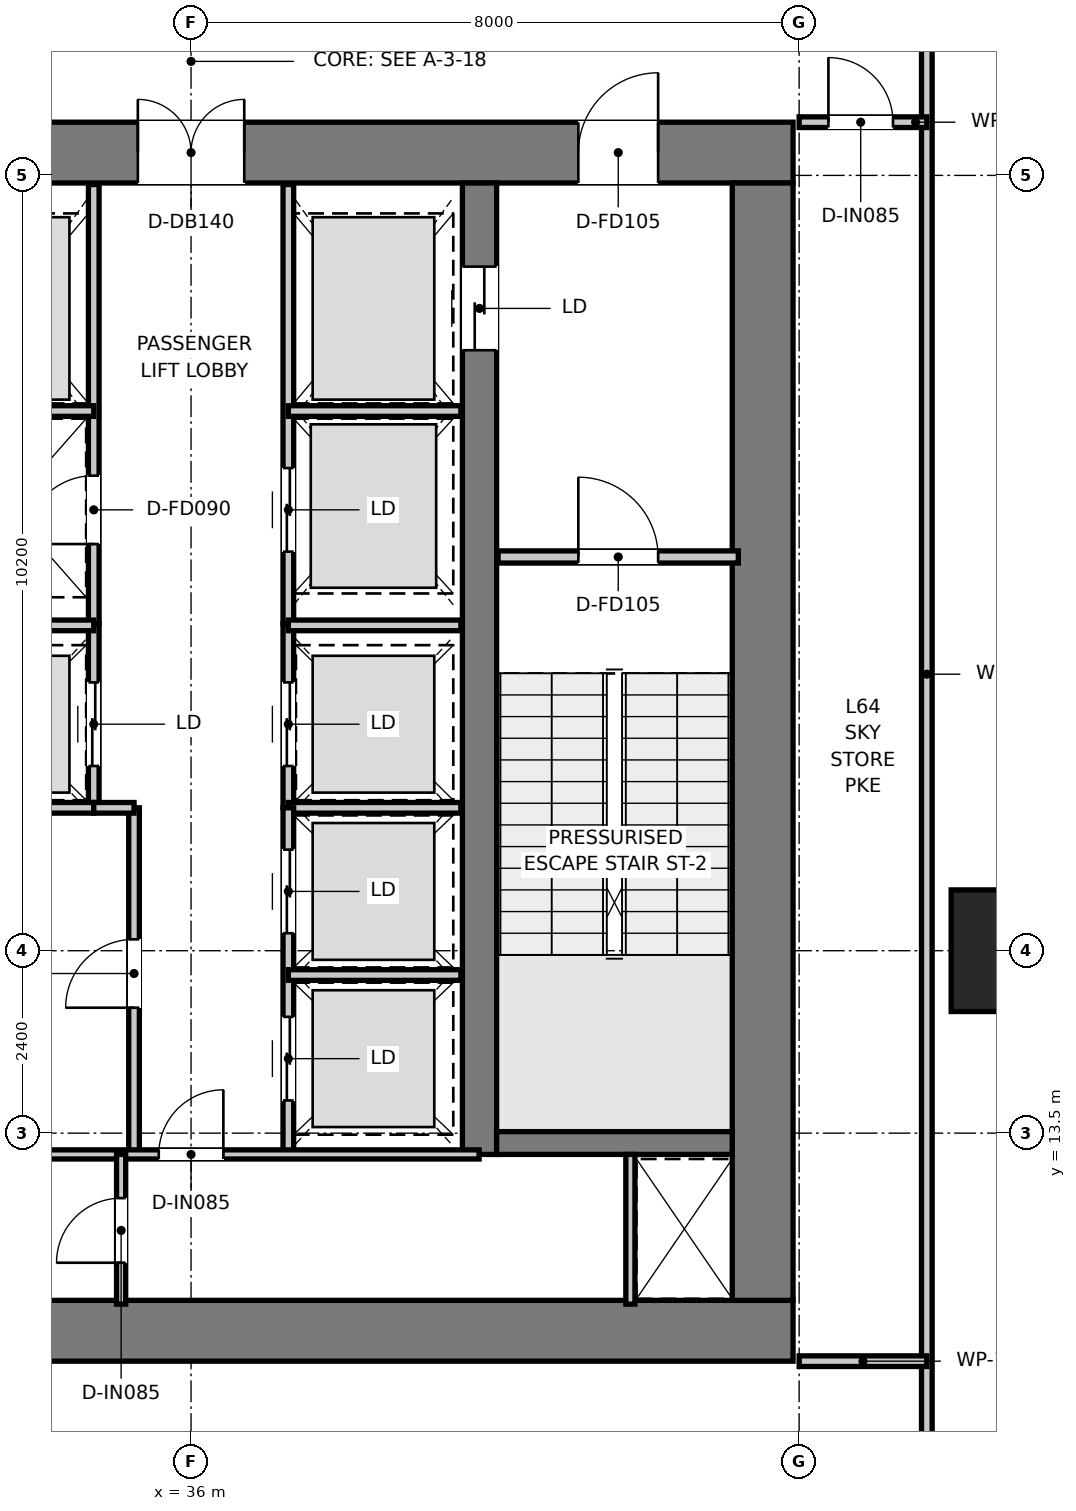
"""IFC4 building model, lengths in metres.
Left out: names, types, materials, properties, quantities, classifications, styles, units other than length and angle.
Written with IfcOpenShell. Run it as: python <this file> out.ifc"""

import sys

from ifc_helpers import new_model, si_unit, direction, frame, frame_2d, origin, origin_2d, place, context, subcontext, project, spatial, rectangle, extrude, source, transform, mapped, element, fill, save


model = new_model("IFC4")
c1 = context("Model", 3, precision=1e-05, world=origin(), true_north=direction((0.0, 1.0)))
c2 = subcontext(c1, "Body", "Model", "MODEL_VIEW")
j1 = project(units=[si_unit("LENGTHUNIT", "METRE"), si_unit("PLANEANGLEUNIT", "RADIAN")], contexts=[c1])
p1 = place(None, origin())
s1 = spatial("IfcSite", under=j1, at=p1, CompositionType="ELEMENT")
p2 = place(p1, origin())
s2 = spatial("IfcBuilding", under=s1, at=p2, CompositionType="ELEMENT")
p3 = place(p2, frame((0.0, 0.0, 262.6)))
s3 = spatial("IfcBuildingStorey", under=s2, at=p3, CompositionType="ELEMENT", Elevation=262.6)
p4 = place(p3, frame((28.08, 10.9, 0.0), z_axis=(0.0, 0.0, 1.0), x_axis=(1.0, 0.0, 0.0)))
e1 = element("IfcWall", 1, at=p4, inside=s3, PredefinedType="SHEAR", context=c2, shape_type="SweptSolid", body=[
    extrude(rectangle(XDim=15.84, YDim=0.8, at=frame_2d((7.92, 0.0))), origin(), (0.0, 0.0, 1.0), 4.8),
])
p5 = place(p3, frame((28.08, 26.4, 0.0), z_axis=(0.0, 0.0, 1.0), x_axis=(1.0, 0.0, 0.0)))
e2 = element("IfcWall", 2, at=p5, inside=s3, PredefinedType="SHEAR", context=c2, shape_type="SweptSolid", body=[
    extrude(rectangle(XDim=15.84, YDim=0.8, at=frame_2d((7.92, 0.0))), origin(), (0.0, 0.0, 1.0), 4.8),
])
p6 = place(p5, frame((7.22, 0.0, 0.0)))
e3 = element("IfcOpeningElement", 3, at=p6, cuts=e2, PredefinedType="OPENING", context=c2, shape_type="SweptSolid", body=[
    extrude(rectangle(XDim=1.4, YDim=2.2, at=frame_2d((0.7, 1.1))), frame((0.0, 0.41, 0.0), z_axis=(0.0, -1.0, 0.0), x_axis=(1.0, 0.0, 0.0)), (0.0, 0.0, 1.0), 0.82),
])
p7 = place(p5, frame((1.775, 0.0, 0.0)))
e4 = element("IfcOpeningElement", 4, at=p7, cuts=e2, PredefinedType="OPENING", context=c2, shape_type="SweptSolid", body=[
    extrude(rectangle(XDim=1.05, YDim=2.1, at=frame_2d((0.525, 1.05))), frame((0.0, 0.41, 0.0), z_axis=(0.0, -1.0, 0.0), x_axis=(1.0, 0.0, 0.0)), (0.0, 0.0, 1.0), 0.82),
])
p8 = place(p5, frame((13.015, 0.0, 0.0)))
e5 = element("IfcOpeningElement", 5, at=p8, cuts=e2, PredefinedType="OPENING", context=c2, shape_type="SweptSolid", body=[
    extrude(rectangle(XDim=1.05, YDim=2.1, at=frame_2d((0.525, 1.05))), frame((0.0, 0.41, 0.0), z_axis=(0.0, -1.0, 0.0), x_axis=(1.0, 0.0, 0.0)), (0.0, 0.0, 1.0), 0.82),
])
p9 = place(p3, frame((43.52, 11.3, 0.0), z_axis=(0.0, 0.0, 1.0), x_axis=(0.0, 1.0, 0.0)))
e6 = element("IfcWall", 6, at=p9, inside=s3, PredefinedType="SHEAR", context=c2, shape_type="SweptSolid", body=[
    extrude(rectangle(XDim=14.7, YDim=0.8, at=frame_2d((7.35, 0.0))), origin(), (0.0, 0.0, 1.0), 4.8),
])
p10 = place(p3, frame((39.795, 13.22, 0.0), z_axis=(0.0, 0.0, 1.0), x_axis=(0.0, 1.0, 0.0)))
e7 = element("IfcWall", 7, at=p10, inside=s3, PredefinedType="SHEAR", context=c2, shape_type="SweptSolid", body=[
    extrude(rectangle(XDim=12.78, YDim=0.45, at=frame_2d((6.39, 0.0))), origin(), (0.0, 0.0, 1.0), 4.8),
])
p11 = place(p10, frame((10.58, 0.0, 0.0)))
e8 = element("IfcOpeningElement", 8, at=p11, cuts=e7, PredefinedType="OPENING", context=c2, shape_type="SweptSolid", body=[
    extrude(rectangle(XDim=1.1, YDim=2.15, at=frame_2d((0.55, 1.075))), frame((0.0, 0.235, 0.0), z_axis=(0.0, -1.0, 0.0), x_axis=(1.0, 0.0, 0.0)), (0.0, 0.0, 1.0), 0.47),
])
p12 = place(p3, frame((40.02, 13.37, 0.0), z_axis=(0.0, 0.0, 1.0), x_axis=(1.0, 0.0, 0.0)))
e9 = element("IfcWall", 9, at=p12, inside=s3, PredefinedType="SHEAR", context=c2, shape_type="SweptSolid", body=[
    extrude(rectangle(XDim=3.1, YDim=0.3, at=frame_2d((1.55, 0.0))), origin(), (0.0, 0.0, 1.0), 4.8),
])
m1 = source(origin(), c2, "Body", "SweptSolid", [
    extrude(rectangle(XDim=1.6, YDim=1.6, at=origin_2d()), origin(), (0.0, 0.0, 1.0), 4.8),
])
p13 = place(p3, frame((46.8, 15.9, 0.0), z_axis=(0.0, 0.0, 1.0), x_axis=(1.0, 0.0, 0.0)))
e10 = element("IfcColumn", 10, at=p13, inside=s3, PredefinedType="USERDEFINED", context=c2, shape_type="MappedRepresentation", body=[
    mapped(m1, transform((0.0, 0.0, 0.0), x_axis=(1.0, 0.0, 0.0), y_axis=(0.0, 1.0, 0.0), z_axis=(0.0, 0.0, 1.0), scale=1.0)),
])
p14 = place(p3, frame((40.04, 21.08, 0.0), z_axis=(0.0, 0.0, 1.0), x_axis=(1.0, 0.0, 0.0)))
e11 = element("IfcWall", 11, at=p14, inside=s3, PredefinedType="PARTITIONING", context=c2, shape_type="SweptSolid", body=[
    extrude(rectangle(XDim=3.16, YDim=0.16, at=frame_2d((1.58, 0.0))), origin(), (0.0, 0.0, 1.0), 4.52),
])
p15 = place(p14, frame((1.055, 0.0, 0.0)))
e12 = element("IfcOpeningElement", 12, at=p15, cuts=e11, PredefinedType="OPENING", context=c2, shape_type="SweptSolid", body=[
    extrude(rectangle(XDim=1.05, YDim=2.1, at=frame_2d((0.525, 1.05))), frame((0.0, 0.09, 0.0), z_axis=(0.0, -1.0, 0.0), x_axis=(1.0, 0.0, 0.0)), (0.0, 0.0, 1.0), 0.18),
])
p16 = place(p3, frame((34.72, 20.2, 0.0), z_axis=(0.0, 0.0, 1.0), x_axis=(0.0, 1.0, 0.0)))
e13 = element("IfcWall", 13, at=p16, inside=s3, PredefinedType="PARTITIONING", context=c2, shape_type="SweptSolid", body=[
    extrude(rectangle(XDim=5.78, YDim=0.14, at=frame_2d((2.89, 0.0))), origin(), (0.0, 0.0, 1.0), 3.67),
])
p17 = place(p16, frame((1.05, 0.0, 0.0)))
e14 = element("IfcOpeningElement", 14, at=p17, cuts=e13, PredefinedType="OPENING", context=c2, shape_type="SweptSolid", body=[
    extrude(rectangle(XDim=0.9, YDim=2.1, at=frame_2d((0.45, 1.05))), frame((0.0, 0.08, 0.0), z_axis=(0.0, -1.0, 0.0), x_axis=(1.0, 0.0, 0.0)), (0.0, 0.0, 1.0), 0.16),
])
p18 = place(p3, frame((37.28, 20.2, 0.0), z_axis=(0.0, 0.0, 1.0), x_axis=(0.0, 1.0, 0.0)))
e15 = element("IfcWall", 15, at=p18, inside=s3, PredefinedType="PARTITIONING", context=c2, shape_type="SweptSolid", body=[
    extrude(rectangle(XDim=5.78, YDim=0.14, at=frame_2d((2.89, 0.0))), origin(), (0.0, 0.0, 1.0), 3.67),
])
p19 = place(p18, frame((0.95, 0.0, 0.0)))
e16 = element("IfcOpeningElement", 16, at=p19, cuts=e15, PredefinedType="OPENING", context=c2, shape_type="SweptSolid", body=[
    extrude(rectangle(XDim=1.1, YDim=2.15, at=frame_2d((0.55, 1.075))), frame((0.0, 0.08, 0.0), z_axis=(0.0, -1.0, 0.0), x_axis=(1.0, 0.0, 0.0)), (0.0, 0.0, 1.0), 0.16),
])
for number, where, z_axis, x_axis in (
    (17, (32.45, 23.0, 0.0), (0.0, 0.0, 1.0), (1.0, 0.0, 0.0)),
    (18, (37.28, 23.0, 0.0), (0.0, 0.0, 1.0), (1.0, 0.0, 0.0)),
):
    element("IfcWall", number, at=place(p3, frame(where, z_axis=z_axis, x_axis=x_axis)), inside=s3, PredefinedType="PARTITIONING", context=c2, shape_type="SweptSolid", body=[
        extrude(rectangle(XDim=2.27, YDim=0.14, at=frame_2d((1.135, 0.0))), origin(), (0.0, 0.0, 1.0), 3.67),
    ])
p20 = place(p3, frame((34.72, 17.78, 0.0), z_axis=(0.0, 0.0, 1.0), x_axis=(0.0, 1.0, 0.0)))
e19 = element("IfcWall", 19, at=p20, inside=s3, PredefinedType="PARTITIONING", context=c2, shape_type="SweptSolid", body=[
    extrude(rectangle(XDim=2.42, YDim=0.14, at=frame_2d((1.21, 0.0))), origin(), (0.0, 0.0, 1.0), 4.52),
])
p21 = place(p20, frame((0.55, 0.0, 0.0)))
e20 = element("IfcOpeningElement", 20, at=p21, cuts=e19, PredefinedType="OPENING", context=c2, shape_type="SweptSolid", body=[
    extrude(rectangle(XDim=1.1, YDim=2.15, at=frame_2d((0.55, 1.075))), frame((0.0, 0.08, 0.0), z_axis=(0.0, -1.0, 0.0), x_axis=(1.0, 0.0, 0.0)), (0.0, 0.0, 1.0), 0.16),
])
p22 = place(p3, frame((37.28, 17.78, 0.0), z_axis=(0.0, 0.0, 1.0), x_axis=(0.0, 1.0, 0.0)))
e21 = element("IfcWall", 21, at=p22, inside=s3, PredefinedType="PARTITIONING", context=c2, shape_type="SweptSolid", body=[
    extrude(rectangle(XDim=2.42, YDim=0.14, at=frame_2d((1.21, 0.0))), origin(), (0.0, 0.0, 1.0), 4.52),
])
p23 = place(p22, frame((0.55, 0.0, 0.0)))
e22 = element("IfcOpeningElement", 22, at=p23, cuts=e21, PredefinedType="OPENING", context=c2, shape_type="SweptSolid", body=[
    extrude(rectangle(XDim=1.1, YDim=2.15, at=frame_2d((0.55, 1.075))), frame((0.0, 0.08, 0.0), z_axis=(0.0, -1.0, 0.0), x_axis=(1.0, 0.0, 0.0)), (0.0, 0.0, 1.0), 0.16),
])
for number, where, z_axis, x_axis in (
    (23, (32.45, 17.78, 0.0), (0.0, 0.0, 1.0), (1.0, 0.0, 0.0)),
    (24, (32.45, 20.18, 0.0), (0.0, 0.0, 1.0), (1.0, 0.0, 0.0)),
    (25, (37.28, 17.78, 0.0), (0.0, 0.0, 1.0), (1.0, 0.0, 0.0)),
    (26, (37.28, 20.18, 0.0), (0.0, 0.0, 1.0), (1.0, 0.0, 0.0)),
):
    element("IfcWall", number, at=place(p3, frame(where, z_axis=z_axis, x_axis=x_axis)), inside=s3, PredefinedType="PARTITIONING", context=c2, shape_type="SweptSolid", body=[
        extrude(rectangle(XDim=2.27, YDim=0.14, at=frame_2d((1.135, 0.0))), origin(), (0.0, 0.0, 1.0), 4.52),
    ])
p24 = place(p3, frame((35.25, 13.22, 0.0), z_axis=(0.0, 0.0, 1.0), x_axis=(0.0, 1.0, 0.0)))
e27 = element("IfcWall", 27, at=p24, inside=s3, PredefinedType="PARTITIONING", context=c2, shape_type="SweptSolid", body=[
    extrude(rectangle(XDim=4.56, YDim=0.14, at=frame_2d((2.28, 0.0))), origin(), (0.0, 0.0, 1.0), 4.52),
])
p25 = place(p24, frame((1.93, 0.0, 0.0)))
e28 = element("IfcOpeningElement", 28, at=p25, cuts=e27, PredefinedType="OPENING", context=c2, shape_type="SweptSolid", body=[
    extrude(rectangle(XDim=0.9, YDim=2.1, at=frame_2d((0.45, 1.05))), frame((0.0, 0.08, 0.0), z_axis=(0.0, -1.0, 0.0), x_axis=(1.0, 0.0, 0.0)), (0.0, 0.0, 1.0), 0.16),
])
p26 = place(p3, frame((34.72, 17.78, 0.0), z_axis=(0.0, 0.0, 1.0), x_axis=(1.0, 0.0, 0.0)))
e29 = element("IfcWall", 29, at=p26, inside=s3, PredefinedType="PARTITIONING", context=c2, shape_type="SweptSolid", body=[
    extrude(rectangle(XDim=0.53, YDim=0.14, at=frame_2d((0.265, 0.0))), origin(), (0.0, 0.0, 1.0), 4.52),
])
p27 = place(p3, frame((37.28, 13.22, 0.0), z_axis=(0.0, 0.0, 1.0), x_axis=(0.0, 1.0, 0.0)))
e30 = element("IfcWall", 30, at=p27, inside=s3, PredefinedType="PARTITIONING", context=c2, shape_type="SweptSolid", body=[
    extrude(rectangle(XDim=4.56, YDim=0.14, at=frame_2d((2.28, 0.0))), origin(), (0.0, 0.0, 1.0), 4.52),
])
p28 = place(p27, frame((0.71, 0.0, 0.0)))
e31 = element("IfcOpeningElement", 31, at=p28, cuts=e30, PredefinedType="OPENING", context=c2, shape_type="SweptSolid", body=[
    extrude(rectangle(XDim=1.1, YDim=2.15, at=frame_2d((0.55, 1.075))), frame((0.0, 0.08, 0.0), z_axis=(0.0, -1.0, 0.0), x_axis=(1.0, 0.0, 0.0)), (0.0, 0.0, 1.0), 0.16),
])
p29 = place(p27, frame((2.91, 0.0, 0.0)))
e32 = element("IfcOpeningElement", 32, at=p29, cuts=e30, PredefinedType="OPENING", context=c2, shape_type="SweptSolid", body=[
    extrude(rectangle(XDim=1.1, YDim=2.15, at=frame_2d((0.55, 1.075))), frame((0.0, 0.08, 0.0), z_axis=(0.0, -1.0, 0.0), x_axis=(1.0, 0.0, 0.0)), (0.0, 0.0, 1.0), 0.16),
])
p30 = place(p3, frame((37.28, 15.58, 0.0), z_axis=(0.0, 0.0, 1.0), x_axis=(1.0, 0.0, 0.0)))
e33 = element("IfcWall", 33, at=p30, inside=s3, PredefinedType="PARTITIONING", context=c2, shape_type="SweptSolid", body=[
    extrude(rectangle(XDim=2.27, YDim=0.14, at=frame_2d((1.135, 0.0))), origin(), (0.0, 0.0, 1.0), 4.52),
])
p31 = place(p3, frame((41.78, 11.25, 0.0), z_axis=(0.0, 0.0, 1.0), x_axis=(0.0, 1.0, 0.0)))
e34 = element("IfcWall", 34, at=p31, inside=s3, PredefinedType="PARTITIONING", context=c2, shape_type="SweptSolid", body=[
    extrude(rectangle(XDim=1.97, YDim=0.12, at=frame_2d((0.985, 0.0))), origin(), (0.0, 0.0, 1.0), 4.52),
])
p32 = place(p3, frame((32.21, 13.22, 0.0), z_axis=(0.0, 0.0, 1.0), x_axis=(1.0, 0.0, 0.0)))
e35 = element("IfcWall", 35, at=p32, inside=s3, PredefinedType="PARTITIONING", context=c2, shape_type="SweptSolid", body=[
    extrude(rectangle(XDim=7.58, YDim=0.12, at=frame_2d((3.79, 0.0))), origin(), (0.0, 0.0, 1.0), 4.52),
])
p33 = place(p32, frame((3.365, 0.0, 0.0)))
e36 = element("IfcOpeningElement", 36, at=p33, cuts=e35, PredefinedType="OPENING", context=c2, shape_type="SweptSolid", body=[
    extrude(rectangle(XDim=0.85, YDim=2.1, at=frame_2d((0.425, 1.05))), frame((0.0, 0.07, 0.0), z_axis=(0.0, -1.0, 0.0), x_axis=(1.0, 0.0, 0.0)), (0.0, 0.0, 1.0), 0.14),
])
p34 = place(p3, frame((35.08, 11.25, 0.0), z_axis=(0.0, 0.0, 1.0), x_axis=(0.0, 1.0, 0.0)))
e37 = element("IfcWall", 37, at=p34, inside=s3, PredefinedType="PARTITIONING", context=c2, shape_type="SweptSolid", body=[
    extrude(rectangle(XDim=1.97, YDim=0.12, at=frame_2d((0.985, 0.0))), origin(), (0.0, 0.0, 1.0), 4.52),
])
p35 = place(p34, frame((0.545, 0.0, 0.0)))
e38 = element("IfcOpeningElement", 38, at=p35, cuts=e37, PredefinedType="OPENING", context=c2, shape_type="SweptSolid", body=[
    extrude(rectangle(XDim=0.85, YDim=2.1, at=frame_2d((0.425, 1.05))), frame((0.0, 0.07, 0.0), z_axis=(0.0, -1.0, 0.0), x_axis=(1.0, 0.0, 0.0)), (0.0, 0.0, 1.0), 0.14),
])
p36 = place(p3, frame((45.68, 8.276, 0.0), z_axis=(0.0, 0.0, 1.0), x_axis=(0.0, 1.0, 0.0)))
e39 = element("IfcWall", 39, at=p36, inside=s3, PredefinedType="PARTITIONING", context=c2, shape_type="SweptSolid", body=[
    extrude(rectangle(XDim=38.902, YDim=0.14, at=frame_2d((19.451, 0.0))), origin(), (0.0, 0.0, 1.0), 3.88),
])
p37 = place(p36, frame((22.674, 0.0, 0.0)))
e40 = element("IfcOpeningElement", 40, at=p37, cuts=e39, PredefinedType="OPENING", context=c2, shape_type="SweptSolid", body=[
    extrude(rectangle(XDim=1.1, YDim=2.15, at=frame_2d((0.55, 1.075))), frame((0.0, 0.08, 0.0), z_axis=(0.0, -1.0, 0.0), x_axis=(1.0, 0.0, 0.0)), (0.0, 0.0, 1.0), 0.16),
])
p38 = place(p3, frame((44.0, 26.8, 0.0), z_axis=(0.0, 0.0, 1.0), x_axis=(1.0, 0.0, 0.0)))
e41 = element("IfcWall", 41, at=p38, inside=s3, PredefinedType="PARTITIONING", context=c2, shape_type="SweptSolid", body=[
    extrude(rectangle(XDim=1.68, YDim=0.14, at=frame_2d((0.84, 0.0))), origin(), (0.0, 0.0, 1.0), 4.03),
])
p39 = place(p38, frame((0.385, 0.0, 0.0)))
e42 = element("IfcOpeningElement", 42, at=p39, cuts=e41, PredefinedType="OPENING", context=c2, shape_type="SweptSolid", body=[
    extrude(rectangle(XDim=0.85, YDim=2.1, at=frame_2d((0.425, 1.05))), frame((0.0, 0.08, 0.0), z_axis=(0.0, -1.0, 0.0), x_axis=(1.0, 0.0, 0.0)), (0.0, 0.0, 1.0), 0.16),
])
p40 = place(p3, frame((44.0, 10.5, 0.0), z_axis=(0.0, 0.0, 1.0), x_axis=(1.0, 0.0, 0.0)))
e43 = element("IfcWall", 43, at=p40, inside=s3, PredefinedType="PARTITIONING", context=c2, shape_type="SweptSolid", body=[
    extrude(rectangle(XDim=1.68, YDim=0.14, at=frame_2d((0.84, 0.0))), origin(), (0.0, 0.0, 1.0), 4.52),
])
p41 = place(p15, origin())
e44 = element("IfcDoor", 44, at=p41, inside=s3, OperationType="SINGLE_SWING_LEFT", PredefinedType="DOOR", context=c2, shape_type="SweptSolid", body=[
    extrude(rectangle(XDim=1.05, YDim=2.1, at=frame_2d((0.525, 1.05))), frame((0.0, 0.025, 0.0), z_axis=(0.0, -1.0, 0.0), x_axis=(1.0, 0.0, 0.0)), (0.0, 0.0, 1.0), 0.05),
])
fill(e12, e44)
p42 = place(p6, origin())
e45 = element("IfcDoor", 45, at=p42, inside=s3, OperationType="DOUBLE_DOOR_SINGLE_SWING", PredefinedType="DOOR", context=c2, shape_type="SweptSolid", body=[
    extrude(rectangle(XDim=1.4, YDim=2.2, at=frame_2d((0.7, 1.1))), frame((0.0, 0.025, 0.0), z_axis=(0.0, -1.0, 0.0), x_axis=(1.0, 0.0, 0.0)), (0.0, 0.0, 1.0), 0.05),
])
fill(e3, e45)
p43 = place(p8, origin())
e46 = element("IfcDoor", 46, at=p43, inside=s3, OperationType="SINGLE_SWING_RIGHT", PredefinedType="DOOR", context=c2, shape_type="SweptSolid", body=[
    extrude(rectangle(XDim=1.05, YDim=2.1, at=frame_2d((0.525, 1.05))), frame((0.0, 0.025, 0.0), z_axis=(0.0, -1.0, 0.0), x_axis=(1.0, 0.0, 0.0)), (0.0, 0.0, 1.0), 0.05),
])
fill(e5, e46)
p44 = place(p11, origin())
e47 = element("IfcDoor", 47, at=p44, inside=s3, OperationType="DOUBLE_DOOR_SLIDING", PredefinedType="DOOR", context=c2, shape_type="SweptSolid", body=[
    extrude(rectangle(XDim=1.1, YDim=2.15, at=frame_2d((0.55, 1.075))), frame((0.0, 0.025, 0.0), z_axis=(0.0, -1.0, 0.0), x_axis=(1.0, 0.0, 0.0)), (0.0, 0.0, 1.0), 0.05),
])
fill(e8, e47)
p45 = place(p17, origin())
e48 = element("IfcDoor", 48, at=p45, inside=s3, OperationType="SINGLE_SWING_LEFT", PredefinedType="DOOR", context=c2, shape_type="SweptSolid", body=[
    extrude(rectangle(XDim=0.9, YDim=2.1, at=frame_2d((0.45, 1.05))), frame((0.0, 0.025, 0.0), z_axis=(0.0, -1.0, 0.0), x_axis=(1.0, 0.0, 0.0)), (0.0, 0.0, 1.0), 0.05),
])
fill(e14, e48)
p46 = place(p19, origin())
e49 = element("IfcDoor", 49, at=p46, inside=s3, OperationType="DOUBLE_DOOR_SLIDING", PredefinedType="DOOR", context=c2, shape_type="SweptSolid", body=[
    extrude(rectangle(XDim=1.1, YDim=2.15, at=frame_2d((0.55, 1.075))), frame((0.0, 0.025, 0.0), z_axis=(0.0, -1.0, 0.0), x_axis=(1.0, 0.0, 0.0)), (0.0, 0.0, 1.0), 0.05),
])
fill(e16, e49)
p47 = place(p21, origin())
e50 = element("IfcDoor", 50, at=p47, inside=s3, OperationType="DOUBLE_DOOR_SLIDING", PredefinedType="DOOR", context=c2, shape_type="SweptSolid", body=[
    extrude(rectangle(XDim=1.1, YDim=2.15, at=frame_2d((0.55, 1.075))), frame((0.0, 0.025, 0.0), z_axis=(0.0, -1.0, 0.0), x_axis=(1.0, 0.0, 0.0)), (0.0, 0.0, 1.0), 0.05),
])
fill(e20, e50)
p48 = place(p23, origin())
e51 = element("IfcDoor", 51, at=p48, inside=s3, OperationType="DOUBLE_DOOR_SLIDING", PredefinedType="DOOR", context=c2, shape_type="SweptSolid", body=[
    extrude(rectangle(XDim=1.1, YDim=2.15, at=frame_2d((0.55, 1.075))), frame((0.0, 0.025, 0.0), z_axis=(0.0, -1.0, 0.0), x_axis=(1.0, 0.0, 0.0)), (0.0, 0.0, 1.0), 0.05),
])
fill(e22, e51)
p49 = place(p25, origin())
e52 = element("IfcDoor", 52, at=p49, inside=s3, OperationType="SINGLE_SWING_LEFT", PredefinedType="DOOR", context=c2, shape_type="SweptSolid", body=[
    extrude(rectangle(XDim=0.9, YDim=2.1, at=frame_2d((0.45, 1.05))), frame((0.0, 0.025, 0.0), z_axis=(0.0, -1.0, 0.0), x_axis=(1.0, 0.0, 0.0)), (0.0, 0.0, 1.0), 0.05),
])
fill(e28, e52)
p50 = place(p28, origin())
e53 = element("IfcDoor", 53, at=p50, inside=s3, OperationType="DOUBLE_DOOR_SLIDING", PredefinedType="DOOR", context=c2, shape_type="SweptSolid", body=[
    extrude(rectangle(XDim=1.1, YDim=2.15, at=frame_2d((0.55, 1.075))), frame((0.0, 0.025, 0.0), z_axis=(0.0, -1.0, 0.0), x_axis=(1.0, 0.0, 0.0)), (0.0, 0.0, 1.0), 0.05),
])
fill(e31, e53)
p51 = place(p29, origin())
e54 = element("IfcDoor", 54, at=p51, inside=s3, OperationType="DOUBLE_DOOR_SLIDING", PredefinedType="DOOR", context=c2, shape_type="SweptSolid", body=[
    extrude(rectangle(XDim=1.1, YDim=2.15, at=frame_2d((0.55, 1.075))), frame((0.0, 0.025, 0.0), z_axis=(0.0, -1.0, 0.0), x_axis=(1.0, 0.0, 0.0)), (0.0, 0.0, 1.0), 0.05),
])
fill(e32, e54)
p52 = place(p33, origin())
e55 = element("IfcDoor", 55, at=p52, inside=s3, OperationType="SINGLE_SWING_RIGHT", PredefinedType="DOOR", context=c2, shape_type="SweptSolid", body=[
    extrude(rectangle(XDim=0.85, YDim=2.1, at=frame_2d((0.425, 1.05))), frame((0.0, 0.025, 0.0), z_axis=(0.0, -1.0, 0.0), x_axis=(1.0, 0.0, 0.0)), (0.0, 0.0, 1.0), 0.05),
])
fill(e36, e55)
p53 = place(p35, origin())
e56 = element("IfcDoor", 56, at=p53, inside=s3, OperationType="SINGLE_SWING_LEFT", PredefinedType="DOOR", context=c2, shape_type="SweptSolid", body=[
    extrude(rectangle(XDim=0.85, YDim=2.1, at=frame_2d((0.425, 1.05))), frame((0.0, 0.025, 0.0), z_axis=(0.0, -1.0, 0.0), x_axis=(1.0, 0.0, 0.0)), (0.0, 0.0, 1.0), 0.05),
])
fill(e38, e56)
p54 = place(p39, origin())
e57 = element("IfcDoor", 57, at=p54, inside=s3, OperationType="SINGLE_SWING_LEFT", PredefinedType="DOOR", context=c2, shape_type="SweptSolid", body=[
    extrude(rectangle(XDim=0.85, YDim=2.1, at=frame_2d((0.425, 1.05))), frame((0.0, 0.025, 0.0), z_axis=(0.0, -1.0, 0.0), x_axis=(1.0, 0.0, 0.0)), (0.0, 0.0, 1.0), 0.05),
])
fill(e42, e57)
save(model, sys.argv[1])
